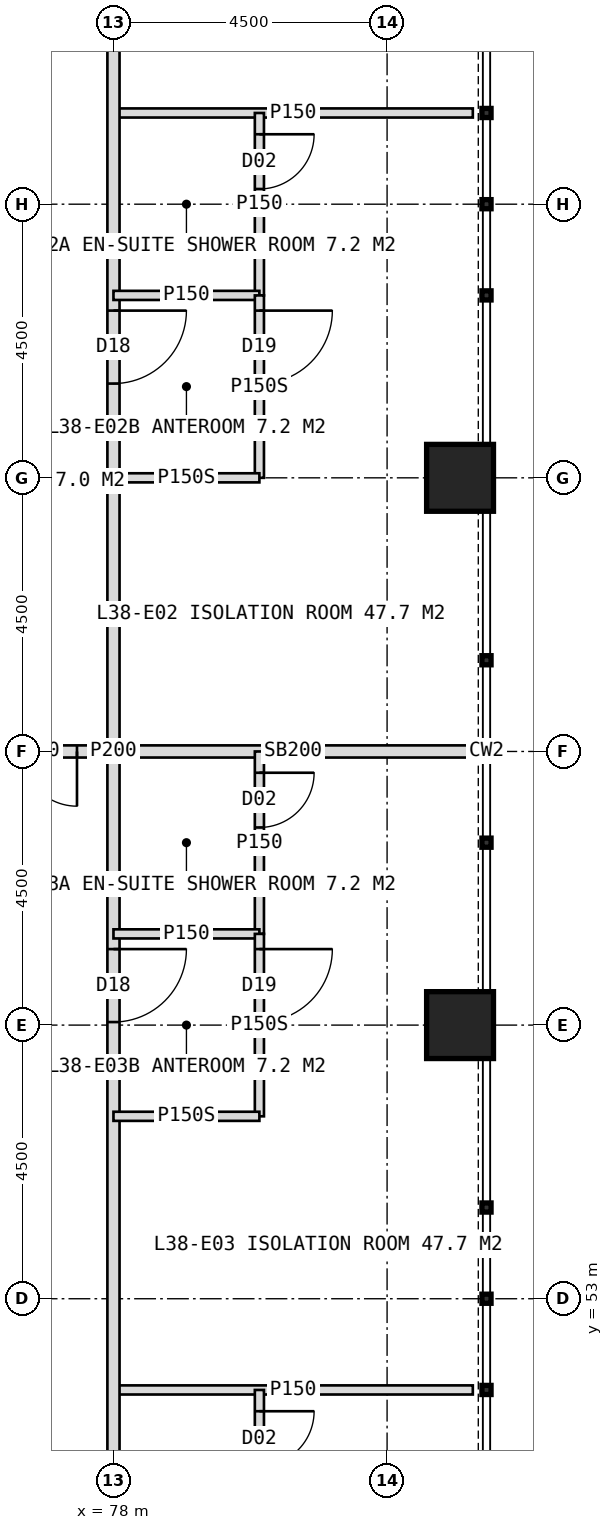
"""IFC4 building model, lengths in metres.
Left out: names, types, materials, properties, quantities, classifications, styles, units other than length and angle.
Written with IfcOpenShell. Run it as: python <this file> out.ifc"""

import sys

from ifc_helpers import new_model, si_unit, direction, frame, frame_2d, origin, origin_2d, place, context, subcontext, project, spatial, rectangle, hollow_rectangle, extrude, element, fill, save


model = new_model("IFC4")
c1 = context("Model", 3, precision=1e-05, world=origin(), true_north=direction((0.0, 1.0)))
c2 = subcontext(c1, "Body", "Model", "MODEL_VIEW")
j1 = project(units=[si_unit("LENGTHUNIT", "METRE"), si_unit("PLANEANGLEUNIT", "RADIAN")], contexts=[c1])
p1 = place(None, origin())
s1 = spatial("IfcSite", under=j1, at=p1, CompositionType="ELEMENT")
p2 = place(p1, origin())
s2 = spatial("IfcBuilding", under=s1, at=p2, CompositionType="ELEMENT")
p3 = place(p2, frame((0.0, 0.0, 160.0)))
s3 = spatial("IfcBuildingStorey", under=s2, at=p3, CompositionType="ELEMENT", Elevation=160.0)
for number, where, z_axis, x_axis in (
    (1, (83.7, 57.5, 0.0), (0.0, 0.0, 1.0), (1.0, 0.0, 0.0)),
    (2, (83.7, 66.5, 0.0), (0.0, 0.0, 1.0), (1.0, 0.0, 0.0)),
):
    element("IfcColumn", number, at=place(p3, frame(where, z_axis=z_axis, x_axis=x_axis)), inside=s3, PredefinedType="COLUMN", context=c2, shape_type="SweptSolid", body=[
        extrude(hollow_rectangle(XDim=1.1, YDim=1.1, WallThickness=0.1, at=origin_2d()), origin(), (0.0, 0.0, 1.0), 4.0),
    ])
p4 = place(p3, frame((78.0, 72.5, 0.0), z_axis=(0.0, 0.0, 1.0), x_axis=(1.0, 0.0, 0.0)))
e3 = element("IfcWall", 3, at=p4, inside=s3, PredefinedType="PARTITIONING", context=c2, shape_type="SweptSolid", body=[
    extrude(rectangle(XDim=5.91, YDim=0.15, at=frame_2d((2.955, 0.0))), origin(), (0.0, 0.0, 1.0), 3.75),
])
p5 = place(p3, frame((78.0, 62.0, 0.0), z_axis=(0.0, 0.0, 1.0), x_axis=(1.0, 0.0, 0.0)))
e4 = element("IfcWall", 4, at=p5, inside=s3, PredefinedType="SOLIDWALL", context=c2, shape_type="SweptSolid", body=[
    extrude(rectangle(XDim=5.91, YDim=0.2, at=frame_2d((2.955, 0.0))), origin(), (0.0, 0.0, 1.0), 2.95),
])
p6 = place(p3, frame((78.0, 51.5, 0.0), z_axis=(0.0, 0.0, 1.0), x_axis=(1.0, 0.0, 0.0)))
e5 = element("IfcWall", 5, at=p6, inside=s3, PredefinedType="PARTITIONING", context=c2, shape_type="SweptSolid", body=[
    extrude(rectangle(XDim=5.91, YDim=0.15, at=frame_2d((2.955, 0.0))), origin(), (0.0, 0.0, 1.0), 3.75),
])
p7 = place(p3, frame((78.0, 80.0, 0.0), z_axis=(0.0, 0.0, 1.0), x_axis=(0.0, -1.0, 0.0)))
e6 = element("IfcWall", 6, at=p7, inside=s3, PredefinedType="PARTITIONING", context=c2, shape_type="SweptSolid", body=[
    extrude(rectangle(XDim=36.0, YDim=0.2, at=frame_2d((18.0, 0.0))), origin(), (0.0, 0.0, 1.0), 3.75),
])
p8 = place(p7, frame((3.25, 0.0, 0.0)))
e7 = element("IfcOpeningElement", 7, at=p8, cuts=e6, PredefinedType="OPENING", context=c2, shape_type="SweptSolid", body=[
    extrude(rectangle(XDim=1.2, YDim=2.2, at=frame_2d((0.6, 1.1))), frame((0.0, 0.11, 0.0), z_axis=(0.0, -1.0, 0.0), x_axis=(1.0, 0.0, 0.0)), (0.0, 0.0, 1.0), 0.22),
])
p9 = place(p7, frame((10.75, 0.0, 0.0)))
e8 = element("IfcOpeningElement", 8, at=p9, cuts=e6, PredefinedType="OPENING", context=c2, shape_type="SweptSolid", body=[
    extrude(rectangle(XDim=1.2, YDim=2.2, at=frame_2d((0.6, 1.1))), frame((0.0, 0.11, 0.0), z_axis=(0.0, -1.0, 0.0), x_axis=(1.0, 0.0, 0.0)), (0.0, 0.0, 1.0), 0.22),
])
p10 = place(p7, frame((21.25, 0.0, 0.0)))
e9 = element("IfcOpeningElement", 9, at=p10, cuts=e6, PredefinedType="OPENING", context=c2, shape_type="SweptSolid", body=[
    extrude(rectangle(XDim=1.2, YDim=2.2, at=frame_2d((0.6, 1.1))), frame((0.0, 0.11, 0.0), z_axis=(0.0, -1.0, 0.0), x_axis=(1.0, 0.0, 0.0)), (0.0, 0.0, 1.0), 0.22),
])
p11 = place(p7, frame((31.75, 0.0, 0.0)))
e10 = element("IfcOpeningElement", 10, at=p11, cuts=e6, PredefinedType="OPENING", context=c2, shape_type="SweptSolid", body=[
    extrude(rectangle(XDim=1.2, YDim=2.2, at=frame_2d((0.6, 1.1))), frame((0.0, 0.11, 0.0), z_axis=(0.0, -1.0, 0.0), x_axis=(1.0, 0.0, 0.0)), (0.0, 0.0, 1.0), 0.22),
])
p12 = place(p3, frame((80.4, 72.5, 0.0), z_axis=(0.0, 0.0, 1.0), x_axis=(0.0, -1.0, 0.0)))
e11 = element("IfcWall", 11, at=p12, inside=s3, PredefinedType="PARTITIONING", context=c2, shape_type="SweptSolid", body=[
    extrude(rectangle(XDim=3.0, YDim=0.15, at=frame_2d((1.5, 0.0))), origin(), (0.0, 0.0, 1.0), 3.75),
])
p13 = place(p12, frame((0.35, 0.0, 0.0)))
e12 = element("IfcOpeningElement", 12, at=p13, cuts=e11, PredefinedType="OPENING", context=c2, shape_type="SweptSolid", body=[
    extrude(rectangle(XDim=0.9, YDim=2.1, at=frame_2d((0.45, 1.05))), frame((0.0, 0.085, 0.0), z_axis=(0.0, -1.0, 0.0), x_axis=(1.0, 0.0, 0.0)), (0.0, 0.0, 1.0), 0.17),
])
p14 = place(p3, frame((78.0, 69.5, 0.0), z_axis=(0.0, 0.0, 1.0), x_axis=(1.0, 0.0, 0.0)))
e13 = element("IfcWall", 13, at=p14, inside=s3, PredefinedType="PARTITIONING", context=c2, shape_type="SweptSolid", body=[
    extrude(rectangle(XDim=2.4, YDim=0.15, at=frame_2d((1.2, 0.0))), origin(), (0.0, 0.0, 1.0), 3.75),
])
p15 = place(p3, frame((80.4, 69.5, 0.0), z_axis=(0.0, 0.0, 1.0), x_axis=(0.0, -1.0, 0.0)))
e14 = element("IfcWall", 14, at=p15, inside=s3, PredefinedType="PARTITIONING", context=c2, shape_type="SweptSolid", body=[
    extrude(rectangle(XDim=3.0, YDim=0.15, at=frame_2d((1.5, 0.0))), origin(), (0.0, 0.0, 1.0), 3.75),
])
p16 = place(p15, frame((0.25, 0.0, 0.0)))
e15 = element("IfcOpeningElement", 15, at=p16, cuts=e14, PredefinedType="OPENING", context=c2, shape_type="SweptSolid", body=[
    extrude(rectangle(XDim=1.2, YDim=2.2, at=frame_2d((0.6, 1.1))), frame((0.0, 0.085, 0.0), z_axis=(0.0, -1.0, 0.0), x_axis=(1.0, 0.0, 0.0)), (0.0, 0.0, 1.0), 0.17),
])
p17 = place(p3, frame((78.0, 66.5, 0.0), z_axis=(0.0, 0.0, 1.0), x_axis=(1.0, 0.0, 0.0)))
e16 = element("IfcWall", 16, at=p17, inside=s3, PredefinedType="PARTITIONING", context=c2, shape_type="SweptSolid", body=[
    extrude(rectangle(XDim=2.4, YDim=0.15, at=frame_2d((1.2, 0.0))), origin(), (0.0, 0.0, 1.0), 2.95),
])
p18 = place(p3, frame((80.4, 62.0, 0.0), z_axis=(0.0, 0.0, 1.0), x_axis=(0.0, -1.0, 0.0)))
e17 = element("IfcWall", 17, at=p18, inside=s3, PredefinedType="PARTITIONING", context=c2, shape_type="SweptSolid", body=[
    extrude(rectangle(XDim=3.0, YDim=0.15, at=frame_2d((1.5, 0.0))), origin(), (0.0, 0.0, 1.0), 3.75),
])
p19 = place(p18, frame((0.35, 0.0, 0.0)))
e18 = element("IfcOpeningElement", 18, at=p19, cuts=e17, PredefinedType="OPENING", context=c2, shape_type="SweptSolid", body=[
    extrude(rectangle(XDim=0.9, YDim=2.1, at=frame_2d((0.45, 1.05))), frame((0.0, 0.085, 0.0), z_axis=(0.0, -1.0, 0.0), x_axis=(1.0, 0.0, 0.0)), (0.0, 0.0, 1.0), 0.17),
])
p20 = place(p3, frame((78.0, 59.0, 0.0), z_axis=(0.0, 0.0, 1.0), x_axis=(1.0, 0.0, 0.0)))
e19 = element("IfcWall", 19, at=p20, inside=s3, PredefinedType="PARTITIONING", context=c2, shape_type="SweptSolid", body=[
    extrude(rectangle(XDim=2.4, YDim=0.15, at=frame_2d((1.2, 0.0))), origin(), (0.0, 0.0, 1.0), 3.75),
])
p21 = place(p3, frame((80.4, 59.0, 0.0), z_axis=(0.0, 0.0, 1.0), x_axis=(0.0, -1.0, 0.0)))
e20 = element("IfcWall", 20, at=p21, inside=s3, PredefinedType="PARTITIONING", context=c2, shape_type="SweptSolid", body=[
    extrude(rectangle(XDim=3.0, YDim=0.15, at=frame_2d((1.5, 0.0))), origin(), (0.0, 0.0, 1.0), 3.75),
])
p22 = place(p21, frame((0.25, 0.0, 0.0)))
e21 = element("IfcOpeningElement", 21, at=p22, cuts=e20, PredefinedType="OPENING", context=c2, shape_type="SweptSolid", body=[
    extrude(rectangle(XDim=1.2, YDim=2.2, at=frame_2d((0.6, 1.1))), frame((0.0, 0.085, 0.0), z_axis=(0.0, -1.0, 0.0), x_axis=(1.0, 0.0, 0.0)), (0.0, 0.0, 1.0), 0.17),
])
p23 = place(p3, frame((78.0, 56.0, 0.0), z_axis=(0.0, 0.0, 1.0), x_axis=(1.0, 0.0, 0.0)))
e22 = element("IfcWall", 22, at=p23, inside=s3, PredefinedType="PARTITIONING", context=c2, shape_type="SweptSolid", body=[
    extrude(rectangle(XDim=2.4, YDim=0.15, at=frame_2d((1.2, 0.0))), origin(), (0.0, 0.0, 1.0), 3.75),
])
p24 = place(p3, frame((80.4, 51.5, 0.0), z_axis=(0.0, 0.0, 1.0), x_axis=(0.0, -1.0, 0.0)))
e23 = element("IfcWall", 23, at=p24, inside=s3, PredefinedType="PARTITIONING", context=c2, shape_type="SweptSolid", body=[
    extrude(rectangle(XDim=3.0, YDim=0.15, at=frame_2d((1.5, 0.0))), origin(), (0.0, 0.0, 1.0), 3.75),
])
p25 = place(p24, frame((0.35, 0.0, 0.0)))
e24 = element("IfcOpeningElement", 24, at=p25, cuts=e23, PredefinedType="OPENING", context=c2, shape_type="SweptSolid", body=[
    extrude(rectangle(XDim=0.9, YDim=2.1, at=frame_2d((0.45, 1.05))), frame((0.0, 0.085, 0.0), z_axis=(0.0, -1.0, 0.0), x_axis=(1.0, 0.0, 0.0)), (0.0, 0.0, 1.0), 0.17),
])
p26 = place(p3, frame((75.3, 62.0, 0.0), z_axis=(0.0, 0.0, 1.0), x_axis=(1.0, 0.0, 0.0)))
e25 = element("IfcWall", 25, at=p26, inside=s3, PredefinedType="SOLIDWALL", context=c2, shape_type="SweptSolid", body=[
    extrude(rectangle(XDim=2.7, YDim=0.2, at=frame_2d((1.35, 0.0))), origin(), (0.0, 0.0, 1.0), 2.95),
])
p27 = place(p26, frame((0.3, 0.0, 0.0)))
e26 = element("IfcOpeningElement", 26, at=p27, cuts=e25, PredefinedType="OPENING", context=c2, shape_type="SweptSolid", body=[
    extrude(rectangle(XDim=1.8, YDim=2.2, at=frame_2d((0.9, 1.1))), frame((0.0, 0.11, 0.0), z_axis=(0.0, -1.0, 0.0), x_axis=(1.0, 0.0, 0.0)), (0.0, 0.0, 1.0), 0.22),
])
p28 = place(p16, origin())
e27 = element("IfcDoor", 27, at=p28, inside=s3, OperationType="SINGLE_SWING_LEFT", PredefinedType="DOOR", context=c2, shape_type="SweptSolid", body=[
    extrude(rectangle(XDim=1.2, YDim=2.2, at=frame_2d((0.6, 1.1))), frame((0.0, 0.025, 0.0), z_axis=(0.0, -1.0, 0.0), x_axis=(1.0, 0.0, 0.0)), (0.0, 0.0, 1.0), 0.05),
])
fill(e15, e27)
p29 = place(p9, origin())
e28 = element("IfcDoor", 28, at=p29, inside=s3, OperationType="SINGLE_SWING_LEFT", PredefinedType="DOOR", context=c2, shape_type="SweptSolid", body=[
    extrude(rectangle(XDim=1.2, YDim=2.2, at=frame_2d((0.6, 1.1))), frame((0.0, 0.025, 0.0), z_axis=(0.0, -1.0, 0.0), x_axis=(1.0, 0.0, 0.0)), (0.0, 0.0, 1.0), 0.05),
])
fill(e8, e28)
p30 = place(p13, origin())
e29 = element("IfcDoor", 29, at=p30, inside=s3, OperationType="SINGLE_SWING_LEFT", PredefinedType="DOOR", context=c2, shape_type="SweptSolid", body=[
    extrude(rectangle(XDim=0.9, YDim=2.1, at=frame_2d((0.45, 1.05))), frame((0.0, 0.025, 0.0), z_axis=(0.0, -1.0, 0.0), x_axis=(1.0, 0.0, 0.0)), (0.0, 0.0, 1.0), 0.05),
])
fill(e12, e29)
p31 = place(p22, origin())
e30 = element("IfcDoor", 30, at=p31, inside=s3, OperationType="SINGLE_SWING_LEFT", PredefinedType="DOOR", context=c2, shape_type="SweptSolid", body=[
    extrude(rectangle(XDim=1.2, YDim=2.2, at=frame_2d((0.6, 1.1))), frame((0.0, 0.025, 0.0), z_axis=(0.0, -1.0, 0.0), x_axis=(1.0, 0.0, 0.0)), (0.0, 0.0, 1.0), 0.05),
])
fill(e21, e30)
p32 = place(p10, origin())
e31 = element("IfcDoor", 31, at=p32, inside=s3, OperationType="SINGLE_SWING_LEFT", PredefinedType="DOOR", context=c2, shape_type="SweptSolid", body=[
    extrude(rectangle(XDim=1.2, YDim=2.2, at=frame_2d((0.6, 1.1))), frame((0.0, 0.025, 0.0), z_axis=(0.0, -1.0, 0.0), x_axis=(1.0, 0.0, 0.0)), (0.0, 0.0, 1.0), 0.05),
])
fill(e9, e31)
p33 = place(p19, origin())
e32 = element("IfcDoor", 32, at=p33, inside=s3, OperationType="SINGLE_SWING_LEFT", PredefinedType="DOOR", context=c2, shape_type="SweptSolid", body=[
    extrude(rectangle(XDim=0.9, YDim=2.1, at=frame_2d((0.45, 1.05))), frame((0.0, 0.025, 0.0), z_axis=(0.0, -1.0, 0.0), x_axis=(1.0, 0.0, 0.0)), (0.0, 0.0, 1.0), 0.05),
])
fill(e18, e32)
p34 = place(p25, origin())
e33 = element("IfcDoor", 33, at=p34, inside=s3, OperationType="SINGLE_SWING_LEFT", PredefinedType="DOOR", context=c2, shape_type="SweptSolid", body=[
    extrude(rectangle(XDim=0.9, YDim=2.1, at=frame_2d((0.45, 1.05))), frame((0.0, 0.025, 0.0), z_axis=(0.0, -1.0, 0.0), x_axis=(1.0, 0.0, 0.0)), (0.0, 0.0, 1.0), 0.05),
])
fill(e24, e33)
p35 = place(p27, origin())
e34 = element("IfcDoor", 34, at=p35, inside=s3, OperationType="DOUBLE_DOOR_DOUBLE_SWING", PredefinedType="DOOR", context=c2, shape_type="SweptSolid", body=[
    extrude(rectangle(XDim=1.8, YDim=2.2, at=frame_2d((0.9, 1.1))), frame((0.0, 0.025, 0.0), z_axis=(0.0, -1.0, 0.0), x_axis=(1.0, 0.0, 0.0)), (0.0, 0.0, 1.0), 0.05),
])
fill(e26, e34)
save(model, sys.argv[1])
